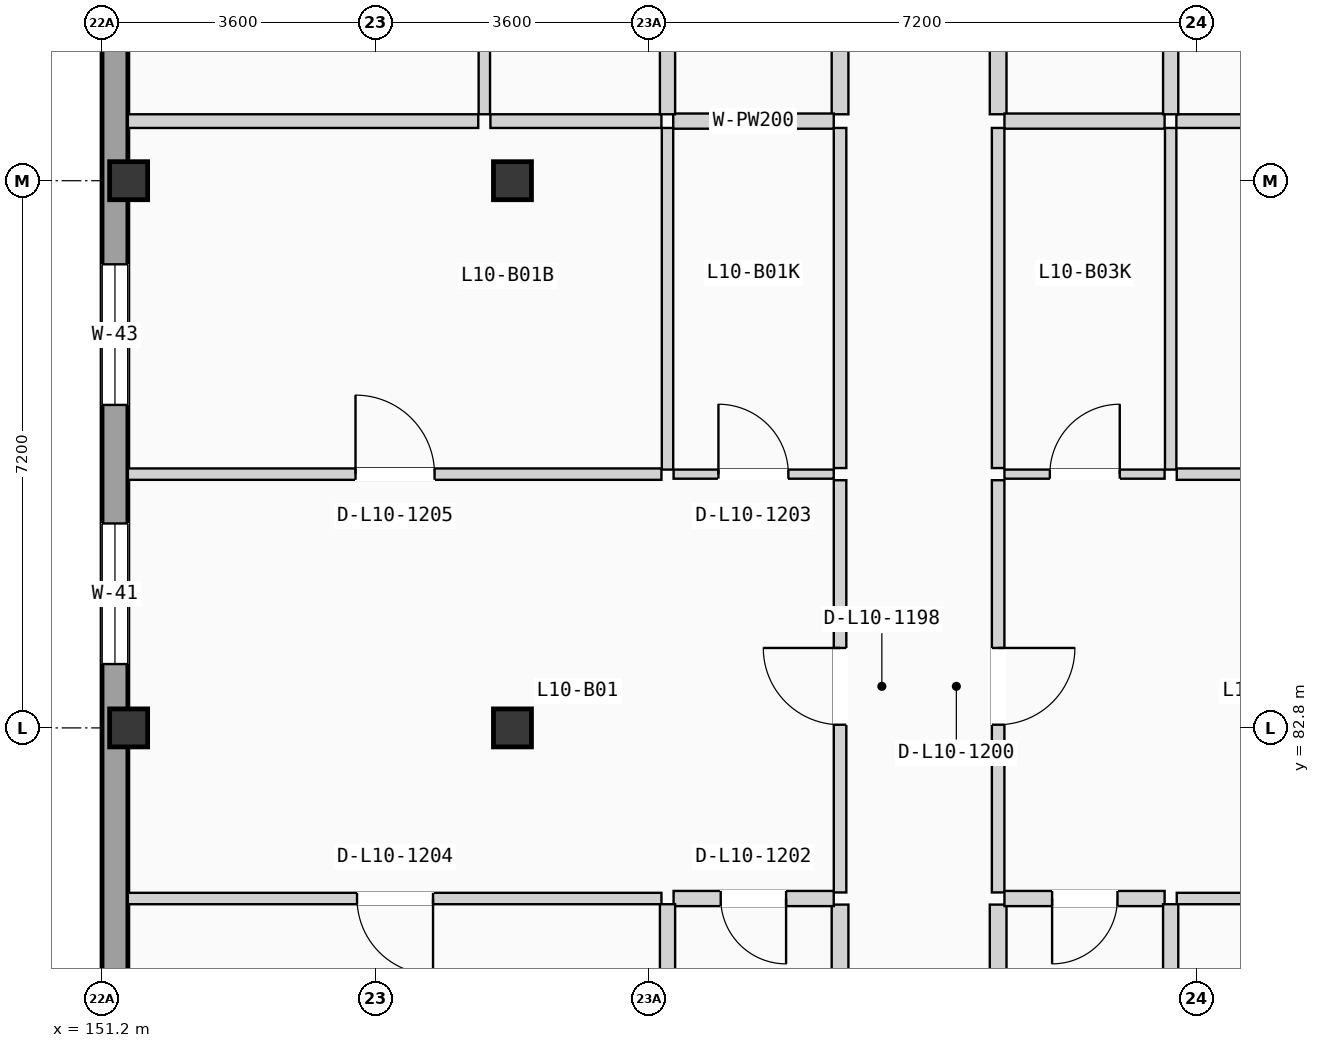
"""IFC4 building model, lengths in metres.
Left out: names, types, materials, properties, quantities, classifications, styles, units other than length and angle.
Written with IfcOpenShell. Run it as: python <this file> out.ifc"""

import sys

from ifc_helpers import new_model, si_unit, direction, frame, frame_2d, origin, origin_2d, place, context, subcontext, project, spatial, rectangle, extrude, element, fill, save


model = new_model("IFC4")
c1 = context("Model", 3, precision=1e-05, world=origin(), true_north=direction((0.0, 1.0)))
c2 = subcontext(c1, "Body", "Model", "MODEL_VIEW")
j1 = project(units=[si_unit("LENGTHUNIT", "METRE"), si_unit("PLANEANGLEUNIT", "RADIAN")], contexts=[c1])
p1 = place(None, origin())
s1 = spatial("IfcSite", under=j1, at=p1, CompositionType="ELEMENT")
p2 = place(p1, origin())
s2 = spatial("IfcBuilding", under=s1, at=p2, CompositionType="ELEMENT")
p3 = place(p2, frame((0.0, 0.0, 34.125)))
s3 = spatial("IfcBuildingStorey", under=s2, at=p3, CompositionType="ELEMENT", Elevation=34.125)
for number, where, z_axis, x_axis in (
    (1, (151.55, 82.8, 0.0), (0.0, 0.0, 1.0), (1.0, 0.0, 0.0)),
    (2, (151.55, 90.0, 0.0), (0.0, 0.0, 1.0), (1.0, 0.0, 0.0)),
    (3, (156.6, 82.8, 0.0), (0.0, 0.0, 1.0), (1.0, 0.0, 0.0)),
    (4, (156.6, 90.0, 0.0), (0.0, 0.0, 1.0), (1.0, 0.0, 0.0)),
):
    element("IfcColumn", number, at=place(p3, frame(where, z_axis=z_axis, x_axis=x_axis)), inside=s3, PredefinedType="COLUMN", context=c2, shape_type="SweptSolid", body=[
        extrude(rectangle(XDim=0.5, YDim=0.5, at=origin_2d()), origin(), (0.0, 0.0, 1.0), 3.15),
    ])
p4 = place(p3, frame((151.37, 68.74, 0.0), z_axis=(0.0, 0.0, 1.0), x_axis=(0.0, 1.0, 0.0)))
e5 = element("IfcWall", 5, at=p4, inside=s3, PredefinedType="SOLIDWALL", context=c2, shape_type="SweptSolid", body=[
    extrude(rectangle(XDim=49.72, YDim=0.34, at=frame_2d((24.86, 0.0))), origin(), (0.0, 0.0, 1.0), 2.89),
])
p5 = place(p4, frame((14.9, 0.0, 0.9)))
e6 = element("IfcOpeningElement", 6, at=p5, cuts=e5, PredefinedType="OPENING", context=c2, shape_type="SweptSolid", body=[
    extrude(rectangle(XDim=1.85, YDim=1.2, at=frame_2d((0.925, 0.6))), frame((0.0, 0.18, 0.0), z_axis=(0.0, -1.0, 0.0), x_axis=(1.0, 0.0, 0.0)), (0.0, 0.0, 1.0), 0.36),
])
p6 = place(p4, frame((8.573, 0.0, 0.855)))
e7 = element("IfcOpeningElement", 7, at=p6, cuts=e5, PredefinedType="OPENING", context=c2, shape_type="SweptSolid", body=[
    extrude(rectangle(XDim=1.85, YDim=1.35, at=frame_2d((0.925, 0.675))), frame((0.0, 0.18, 0.0), z_axis=(0.0, -1.0, 0.0), x_axis=(1.0, 0.0, 0.0)), (0.0, 0.0, 1.0), 0.36),
])
p7 = place(p4, frame((18.31, 0.0, 0.705)))
e8 = element("IfcOpeningElement", 8, at=p7, cuts=e5, PredefinedType="OPENING", context=c2, shape_type="SweptSolid", body=[
    extrude(rectangle(XDim=1.85, YDim=1.5, at=frame_2d((0.925, 0.75))), frame((0.0, 0.18, 0.0), z_axis=(0.0, -1.0, 0.0), x_axis=(1.0, 0.0, 0.0)), (0.0, 0.0, 1.0), 0.36),
])
p8 = place(p4, frame((31.135, 0.0, 0.555)))
e9 = element("IfcOpeningElement", 9, at=p8, cuts=e5, PredefinedType="OPENING", context=c2, shape_type="SweptSolid", body=[
    extrude(rectangle(XDim=1.85, YDim=1.65, at=frame_2d((0.925, 0.825))), frame((0.0, 0.18, 0.0), z_axis=(0.0, -1.0, 0.0), x_axis=(1.0, 0.0, 0.0)), (0.0, 0.0, 1.0), 0.36),
])
p9 = place(p4, frame((24.687, 0.0, 0.85)))
e10 = element("IfcOpeningElement", 10, at=p9, cuts=e5, PredefinedType="OPENING", context=c2, shape_type="SweptSolid", body=[
    extrude(rectangle(XDim=0.95, YDim=1.2, at=frame_2d((0.475, 0.6))), frame((0.0, 0.18, 0.0), z_axis=(0.0, -1.0, 0.0), x_axis=(1.0, 0.0, 0.0)), (0.0, 0.0, 1.0), 0.36),
])
p10 = place(p4, frame((38.195, 0.0, 0.9)))
e11 = element("IfcOpeningElement", 11, at=p10, cuts=e5, PredefinedType="OPENING", context=c2, shape_type="SweptSolid", body=[
    extrude(rectangle(XDim=2.0, YDim=1.2, at=frame_2d((1.0, 0.6))), frame((0.0, 0.18, 0.0), z_axis=(0.0, -1.0, 0.0), x_axis=(1.0, 0.0, 0.0)), (0.0, 0.0, 1.0), 0.36),
])
p11 = place(p3, frame((160.91, 80.635, 0.0), z_axis=(0.0, 0.0, 1.0), x_axis=(0.0, 1.0, 0.0)))
e12 = element("IfcWall", 12, at=p11, inside=s3, PredefinedType="PARTITIONING", context=c2, shape_type="SweptSolid", body=[
    extrude(rectangle(XDim=5.424, YDim=0.165, at=frame_2d((2.712, 0.0))), origin(), (0.0, 0.0, 1.0), 2.87),
])
p12 = place(p11, frame((2.207, 0.0, 0.0)))
e13 = element("IfcOpeningElement", 13, at=p12, cuts=e12, PredefinedType="OPENING", context=c2, shape_type="SweptSolid", body=[
    extrude(rectangle(XDim=1.01, YDim=2.11, at=frame_2d((0.505, 1.055))), frame((0.0, 0.093, 0.0), z_axis=(0.0, -1.0, 0.0), x_axis=(1.0, 0.0, 0.0)), (0.0, 0.0, 1.0), 0.185),
])
p13 = place(p3, frame((160.91, 76.0, 0.0), z_axis=(0.0, 0.0, 1.0), x_axis=(0.0, 1.0, 0.0)))
e14 = element("IfcWall", 14, at=p13, inside=s3, PredefinedType="PLUMBINGWALL", context=c2, shape_type="SweptSolid", body=[
    extrude(rectangle(XDim=4.475, YDim=0.22, at=frame_2d((2.238, 0.0))), origin(), (0.0, 0.0, 1.0), 2.87),
])
p14 = place(p3, frame((160.91, 86.219, 0.0), z_axis=(0.0, 0.0, 1.0), x_axis=(0.0, 1.0, 0.0)))
e15 = element("IfcWall", 15, at=p14, inside=s3, PredefinedType="PARTITIONING", context=c2, shape_type="SweptSolid", body=[
    extrude(rectangle(XDim=4.475, YDim=0.165, at=frame_2d((2.238, 0.0))), origin(), (0.0, 0.0, 1.0), 2.87),
])
p15 = place(p3, frame((160.91, 90.874, 0.0), z_axis=(0.0, 0.0, 1.0), x_axis=(0.0, 1.0, 0.0)))
e16 = element("IfcWall", 16, at=p15, inside=s3, PredefinedType="PLUMBINGWALL", context=c2, shape_type="SweptSolid", body=[
    extrude(rectangle(XDim=7.196, YDim=0.22, at=frame_2d((3.598, 0.0))), origin(), (0.0, 0.0, 1.0), 2.87),
])
p16 = place(p3, frame((162.99, 80.635, 0.0), z_axis=(0.0, 0.0, 1.0), x_axis=(0.0, 1.0, 0.0)))
e17 = element("IfcWall", 17, at=p16, inside=s3, PredefinedType="PARTITIONING", context=c2, shape_type="SweptSolid", body=[
    extrude(rectangle(XDim=5.424, YDim=0.165, at=frame_2d((2.712, 0.0))), origin(), (0.0, 0.0, 1.0), 2.87),
])
p17 = place(p16, frame((2.207, 0.0, 0.0)))
e18 = element("IfcOpeningElement", 18, at=p17, cuts=e17, PredefinedType="OPENING", context=c2, shape_type="SweptSolid", body=[
    extrude(rectangle(XDim=1.01, YDim=2.11, at=frame_2d((0.505, 1.055))), frame((0.0, 0.093, 0.0), z_axis=(0.0, -1.0, 0.0), x_axis=(1.0, 0.0, 0.0)), (0.0, 0.0, 1.0), 0.185),
])
p18 = place(p3, frame((162.99, 75.975, 0.0), z_axis=(0.0, 0.0, 1.0), x_axis=(0.0, 1.0, 0.0)))
e19 = element("IfcWall", 19, at=p18, inside=s3, PredefinedType="PLUMBINGWALL", context=c2, shape_type="SweptSolid", body=[
    extrude(rectangle(XDim=4.5, YDim=0.22, at=frame_2d((2.25, 0.0))), origin(), (0.0, 0.0, 1.0), 2.87),
])
p19 = place(p3, frame((162.99, 86.219, 0.0), z_axis=(0.0, 0.0, 1.0), x_axis=(0.0, 1.0, 0.0)))
e20 = element("IfcWall", 20, at=p19, inside=s3, PredefinedType="PARTITIONING", context=c2, shape_type="SweptSolid", body=[
    extrude(rectangle(XDim=4.475, YDim=0.165, at=frame_2d((2.238, 0.0))), origin(), (0.0, 0.0, 1.0), 2.87),
])
p20 = place(p3, frame((162.99, 90.874, 0.0), z_axis=(0.0, 0.0, 1.0), x_axis=(0.0, 1.0, 0.0)))
e21 = element("IfcWall", 21, at=p20, inside=s3, PredefinedType="PLUMBINGWALL", context=c2, shape_type="SweptSolid", body=[
    extrude(rectangle(XDim=7.196, YDim=0.22, at=frame_2d((3.598, 0.0))), origin(), (0.0, 0.0, 1.0), 2.87),
])
p21 = place(p3, frame((158.72, 80.555, 0.0), z_axis=(0.0, 0.0, 1.0), x_axis=(1.0, 0.0, 0.0)))
e22 = element("IfcWall", 22, at=p21, inside=s3, PredefinedType="PLUMBINGWALL", context=c2, shape_type="SweptSolid", body=[
    extrude(rectangle(XDim=2.107, YDim=0.2, at=frame_2d((1.053, 0.0))), origin(), (0.0, 0.0, 1.0), 2.87),
])
p22 = place(p21, frame((0.62, 0.0, 0.0)))
e23 = element("IfcOpeningElement", 23, at=p22, cuts=e22, PredefinedType="OPENING", context=c2, shape_type="SweptSolid", body=[
    extrude(rectangle(XDim=0.86, YDim=2.0, at=frame_2d((0.43, 1.0))), frame((0.0, 0.11, 0.0), z_axis=(0.0, -1.0, 0.0), x_axis=(1.0, 0.0, 0.0)), (0.0, 0.0, 1.0), 0.22),
])
p23 = place(p3, frame((158.72, 86.139, 0.0), z_axis=(0.0, 0.0, 1.0), x_axis=(1.0, 0.0, 0.0)))
e24 = element("IfcWall", 24, at=p23, inside=s3, PredefinedType="PARTITIONING", context=c2, shape_type="SweptSolid", body=[
    extrude(rectangle(XDim=2.107, YDim=0.12, at=frame_2d((1.053, 0.0))), origin(), (0.0, 0.0, 1.0), 2.87),
])
p24 = place(p23, frame((0.59, 0.0, 0.0)))
e25 = element("IfcOpeningElement", 25, at=p24, cuts=e24, PredefinedType="OPENING", context=c2, shape_type="SweptSolid", body=[
    extrude(rectangle(XDim=0.92, YDim=2.02, at=frame_2d((0.46, 1.01))), frame((0.0, 0.07, 0.0), z_axis=(0.0, -1.0, 0.0), x_axis=(1.0, 0.0, 0.0)), (0.0, 0.0, 1.0), 0.14),
])
p25 = place(p3, frame((151.54, 80.555, 0.0), z_axis=(0.0, 0.0, 1.0), x_axis=(1.0, 0.0, 0.0)))
e26 = element("IfcWall", 26, at=p25, inside=s3, PredefinedType="PARTITIONING", context=c2, shape_type="SweptSolid", body=[
    extrude(rectangle(XDim=7.02, YDim=0.15, at=frame_2d((3.51, 0.0))), origin(), (0.0, 0.0, 1.0), 2.87),
])
p26 = place(p25, frame((3.015, 0.0, 0.0)))
e27 = element("IfcOpeningElement", 27, at=p26, cuts=e26, PredefinedType="OPENING", context=c2, shape_type="SweptSolid", body=[
    extrude(rectangle(XDim=1.0, YDim=2.06, at=frame_2d((0.5, 1.03))), frame((0.0, 0.085, 0.0), z_axis=(0.0, -1.0, 0.0), x_axis=(1.0, 0.0, 0.0)), (0.0, 0.0, 1.0), 0.17),
])
p27 = place(p3, frame((151.54, 86.139, 0.0), z_axis=(0.0, 0.0, 1.0), x_axis=(1.0, 0.0, 0.0)))
e28 = element("IfcWall", 28, at=p27, inside=s3, PredefinedType="PARTITIONING", context=c2, shape_type="SweptSolid", body=[
    extrude(rectangle(XDim=7.02, YDim=0.15, at=frame_2d((3.51, 0.0))), origin(), (0.0, 0.0, 1.0), 2.87),
])
p28 = place(p27, frame((2.995, 0.0, 0.0)))
e29 = element("IfcOpeningElement", 29, at=p28, cuts=e28, PredefinedType="OPENING", context=c2, shape_type="SweptSolid", body=[
    extrude(rectangle(XDim=1.04, YDim=2.08, at=frame_2d((0.52, 1.04))), frame((0.0, 0.085, 0.0), z_axis=(0.0, -1.0, 0.0), x_axis=(1.0, 0.0, 0.0)), (0.0, 0.0, 1.0), 0.17),
])
p29 = place(p3, frame((158.64, 76.0, 0.0), z_axis=(0.0, 0.0, 1.0), x_axis=(0.0, 1.0, 0.0)))
e30 = element("IfcWall", 30, at=p29, inside=s3, PredefinedType="PLUMBINGWALL", context=c2, shape_type="SweptSolid", body=[
    extrude(rectangle(XDim=4.48, YDim=0.2, at=frame_2d((2.24, 0.0))), origin(), (0.0, 0.0, 1.0), 2.87),
])
p30 = place(p3, frame((158.64, 86.199, 0.0), z_axis=(0.0, 0.0, 1.0), x_axis=(0.0, 1.0, 0.0)))
e31 = element("IfcWall", 31, at=p30, inside=s3, PredefinedType="PARTITIONING", context=c2, shape_type="SweptSolid", body=[
    extrude(rectangle(XDim=4.495, YDim=0.15, at=frame_2d((2.248, 0.0))), origin(), (0.0, 0.0, 1.0), 2.87),
])
p31 = place(p3, frame((158.715, 90.784, 0.0), z_axis=(0.0, 0.0, 1.0), x_axis=(1.0, 0.0, 0.0)))
e32 = element("IfcWall", 32, at=p31, inside=s3, PredefinedType="PLUMBINGWALL", context=c2, shape_type="SweptSolid", body=[
    extrude(rectangle(XDim=2.112, YDim=0.2, at=frame_2d((1.056, 0.0))), origin(), (0.0, 0.0, 1.0), 2.87),
])
p32 = place(p3, frame((151.54, 90.784, 0.0), z_axis=(0.0, 0.0, 1.0), x_axis=(1.0, 0.0, 0.0)))
e33 = element("IfcWall", 33, at=p32, inside=s3, PredefinedType="PARTITIONING", context=c2, shape_type="SweptSolid", body=[
    extrude(rectangle(XDim=4.61, YDim=0.18, at=frame_2d((2.305, 0.0))), origin(), (0.0, 0.0, 1.0), 2.87),
])
p33 = place(p3, frame((156.31, 90.784, 0.0), z_axis=(0.0, 0.0, 1.0), x_axis=(1.0, 0.0, 0.0)))
e34 = element("IfcWall", 34, at=p33, inside=s3, PredefinedType="PARTITIONING", context=c2, shape_type="SweptSolid", body=[
    extrude(rectangle(XDim=2.25, YDim=0.18, at=frame_2d((1.125, 0.0))), origin(), (0.0, 0.0, 1.0), 2.87),
])
p34 = place(p3, frame((158.64, 90.874, 0.0), z_axis=(0.0, 0.0, 1.0), x_axis=(0.0, 1.0, 0.0)))
e35 = element("IfcWall", 35, at=p34, inside=s3, PredefinedType="PLUMBINGWALL", context=c2, shape_type="SweptSolid", body=[
    extrude(rectangle(XDim=7.216, YDim=0.2, at=frame_2d((3.608, 0.0))), origin(), (0.0, 0.0, 1.0), 2.87),
])
p35 = place(p34, frame((3.173, 0.0, 0.0)))
e36 = element("IfcOpeningElement", 36, at=p35, cuts=e35, PredefinedType="OPENING", context=c2, shape_type="SweptSolid", body=[
    extrude(rectangle(XDim=0.85, YDim=2.01, at=frame_2d((0.425, 1.005))), frame((0.0, 0.11, 0.0), z_axis=(0.0, -1.0, 0.0), x_axis=(1.0, 0.0, 0.0)), (0.0, 0.0, 1.0), 0.22),
])
p36 = place(p3, frame((156.23, 90.874, 0.0), z_axis=(0.0, 0.0, 1.0), x_axis=(0.0, 1.0, 0.0)))
e37 = element("IfcWall", 37, at=p36, inside=s3, PredefinedType="PARTITIONING", context=c2, shape_type="SweptSolid", body=[
    extrude(rectangle(XDim=7.201, YDim=0.15, at=frame_2d((3.601, 0.0))), origin(), (0.0, 0.0, 1.0), 2.87),
])
p37 = place(p3, frame((163.073, 80.555, 0.0), z_axis=(0.0, 0.0, 1.0), x_axis=(1.0, 0.0, 0.0)))
e38 = element("IfcWall", 38, at=p37, inside=s3, PredefinedType="PLUMBINGWALL", context=c2, shape_type="SweptSolid", body=[
    extrude(rectangle(XDim=2.107, YDim=0.2, at=frame_2d((1.053, 0.0))), origin(), (0.0, 0.0, 1.0), 2.87),
])
p38 = place(p37, frame((0.627, 0.0, 0.0)))
e39 = element("IfcOpeningElement", 39, at=p38, cuts=e38, PredefinedType="OPENING", context=c2, shape_type="SweptSolid", body=[
    extrude(rectangle(XDim=0.86, YDim=2.0, at=frame_2d((0.43, 1.0))), frame((0.0, 0.11, 0.0), z_axis=(0.0, -1.0, 0.0), x_axis=(1.0, 0.0, 0.0)), (0.0, 0.0, 1.0), 0.22),
])
p39 = place(p3, frame((163.073, 86.139, 0.0), z_axis=(0.0, 0.0, 1.0), x_axis=(1.0, 0.0, 0.0)))
e40 = element("IfcWall", 40, at=p39, inside=s3, PredefinedType="PARTITIONING", context=c2, shape_type="SweptSolid", body=[
    extrude(rectangle(XDim=2.107, YDim=0.12, at=frame_2d((1.053, 0.0))), origin(), (0.0, 0.0, 1.0), 2.87),
])
p40 = place(p39, frame((0.597, 0.0, 0.0)))
e41 = element("IfcOpeningElement", 41, at=p40, cuts=e40, PredefinedType="OPENING", context=c2, shape_type="SweptSolid", body=[
    extrude(rectangle(XDim=0.92, YDim=2.02, at=frame_2d((0.46, 1.01))), frame((0.0, 0.07, 0.0), z_axis=(0.0, -1.0, 0.0), x_axis=(1.0, 0.0, 0.0)), (0.0, 0.0, 1.0), 0.14),
])
p41 = place(p3, frame((165.34, 80.555, 0.0), z_axis=(0.0, 0.0, 1.0), x_axis=(1.0, 0.0, 0.0)))
e42 = element("IfcWall", 42, at=p41, inside=s3, PredefinedType="PARTITIONING", context=c2, shape_type="SweptSolid", body=[
    extrude(rectangle(XDim=7.12, YDim=0.15, at=frame_2d((3.56, 0.0))), origin(), (0.0, 0.0, 1.0), 2.87),
])
p42 = place(p41, frame((3.085, 0.0, 0.0)))
e43 = element("IfcOpeningElement", 43, at=p42, cuts=e42, PredefinedType="OPENING", context=c2, shape_type="SweptSolid", body=[
    extrude(rectangle(XDim=0.94, YDim=2.06, at=frame_2d((0.47, 1.03))), frame((0.0, 0.085, 0.0), z_axis=(0.0, -1.0, 0.0), x_axis=(1.0, 0.0, 0.0)), (0.0, 0.0, 1.0), 0.17),
])
p43 = place(p3, frame((165.34, 86.139, 0.0), z_axis=(0.0, 0.0, 1.0), x_axis=(1.0, 0.0, 0.0)))
e44 = element("IfcWall", 44, at=p43, inside=s3, PredefinedType="PARTITIONING", context=c2, shape_type="SweptSolid", body=[
    extrude(rectangle(XDim=7.12, YDim=0.15, at=frame_2d((3.56, 0.0))), origin(), (0.0, 0.0, 1.0), 2.87),
])
p44 = place(p43, frame((3.055, 0.0, 0.0)))
e45 = element("IfcOpeningElement", 45, at=p44, cuts=e44, PredefinedType="OPENING", context=c2, shape_type="SweptSolid", body=[
    extrude(rectangle(XDim=1.0, YDim=2.06, at=frame_2d((0.5, 1.03))), frame((0.0, 0.085, 0.0), z_axis=(0.0, -1.0, 0.0), x_axis=(1.0, 0.0, 0.0)), (0.0, 0.0, 1.0), 0.17),
])
p45 = place(p3, frame((165.26, 75.975, 0.0), z_axis=(0.0, 0.0, 1.0), x_axis=(0.0, 1.0, 0.0)))
e46 = element("IfcWall", 46, at=p45, inside=s3, PredefinedType="PLUMBINGWALL", context=c2, shape_type="SweptSolid", body=[
    extrude(rectangle(XDim=4.505, YDim=0.2, at=frame_2d((2.252, 0.0))), origin(), (0.0, 0.0, 1.0), 2.87),
])
p46 = place(p3, frame((165.26, 86.199, 0.0), z_axis=(0.0, 0.0, 1.0), x_axis=(0.0, 1.0, 0.0)))
e47 = element("IfcWall", 47, at=p46, inside=s3, PredefinedType="PARTITIONING", context=c2, shape_type="SweptSolid", body=[
    extrude(rectangle(XDim=4.495, YDim=0.15, at=frame_2d((2.248, 0.0))), origin(), (0.0, 0.0, 1.0), 2.87),
])
p47 = place(p3, frame((163.073, 90.784, 0.0), z_axis=(0.0, 0.0, 1.0), x_axis=(1.0, 0.0, 0.0)))
e48 = element("IfcWall", 48, at=p47, inside=s3, PredefinedType="PLUMBINGWALL", context=c2, shape_type="SweptSolid", body=[
    extrude(rectangle(XDim=2.107, YDim=0.2, at=frame_2d((1.053, 0.0))), origin(), (0.0, 0.0, 1.0), 2.87),
])
p48 = place(p3, frame((165.335, 90.784, 0.0), z_axis=(0.0, 0.0, 1.0), x_axis=(1.0, 0.0, 0.0)))
e49 = element("IfcWall", 49, at=p48, inside=s3, PredefinedType="PARTITIONING", context=c2, shape_type="SweptSolid", body=[
    extrude(rectangle(XDim=2.255, YDim=0.18, at=frame_2d((1.127, 0.0))), origin(), (0.0, 0.0, 1.0), 2.87),
])
p49 = place(p3, frame((165.26, 90.874, 0.0), z_axis=(0.0, 0.0, 1.0), x_axis=(0.0, 1.0, 0.0)))
e50 = element("IfcWall", 50, at=p49, inside=s3, PredefinedType="PLUMBINGWALL", context=c2, shape_type="SweptSolid", body=[
    extrude(rectangle(XDim=7.216, YDim=0.2, at=frame_2d((3.608, 0.0))), origin(), (0.0, 0.0, 1.0), 2.87),
])
p50 = place(p49, frame((3.173, 0.0, 0.0)))
e51 = element("IfcOpeningElement", 51, at=p50, cuts=e50, PredefinedType="OPENING", context=c2, shape_type="SweptSolid", body=[
    extrude(rectangle(XDim=0.85, YDim=2.01, at=frame_2d((0.425, 1.005))), frame((0.0, 0.11, 0.0), z_axis=(0.0, -1.0, 0.0), x_axis=(1.0, 0.0, 0.0)), (0.0, 0.0, 1.0), 0.22),
])
p51 = place(p5, origin())
e52 = element("IfcWindow", 52, at=p51, inside=s3, PartitioningType="DOUBLE_PANEL_VERTICAL", PredefinedType="WINDOW", context=c2, shape_type="SweptSolid", body=[
    extrude(rectangle(XDim=1.85, YDim=1.2, at=frame_2d((0.925, 0.6))), frame((0.0, 0.03, 0.0), z_axis=(0.0, -1.0, 0.0), x_axis=(1.0, 0.0, 0.0)), (0.0, 0.0, 1.0), 0.06),
])
fill(e6, e52)
p52 = place(p7, origin())
e53 = element("IfcWindow", 53, at=p52, inside=s3, PartitioningType="DOUBLE_PANEL_VERTICAL", PredefinedType="WINDOW", context=c2, shape_type="SweptSolid", body=[
    extrude(rectangle(XDim=1.85, YDim=1.5, at=frame_2d((0.925, 0.75))), frame((0.0, 0.03, 0.0), z_axis=(0.0, -1.0, 0.0), x_axis=(1.0, 0.0, 0.0)), (0.0, 0.0, 1.0), 0.06),
])
fill(e8, e53)
p53 = place(p12, origin())
e54 = element("IfcDoor", 54, at=p53, inside=s3, OperationType="SINGLE_SWING_RIGHT", PredefinedType="DOOR", context=c2, shape_type="SweptSolid", body=[
    extrude(rectangle(XDim=1.01, YDim=2.11, at=frame_2d((0.505, 1.055))), frame((0.0, 0.025, 0.0), z_axis=(0.0, -1.0, 0.0), x_axis=(1.0, 0.0, 0.0)), (0.0, 0.0, 1.0), 0.05),
])
fill(e13, e54)
p54 = place(p17, frame((1.01, 0.0, 0.0), z_axis=(0.0, 0.0, 1.0), x_axis=(-1.0, 0.0, 0.0)))
e55 = element("IfcDoor", 55, at=p54, inside=s3, OperationType="SINGLE_SWING_RIGHT", PredefinedType="DOOR", context=c2, shape_type="SweptSolid", body=[
    extrude(rectangle(XDim=1.01, YDim=2.11, at=frame_2d((0.505, 1.055))), frame((0.0, 0.025, 0.0), z_axis=(0.0, -1.0, 0.0), x_axis=(1.0, 0.0, 0.0)), (0.0, 0.0, 1.0), 0.05),
])
fill(e18, e55)
p55 = place(p22, frame((0.86, 0.0, 0.0), z_axis=(0.0, 0.0, 1.0), x_axis=(-1.0, 0.0, 0.0)))
e56 = element("IfcDoor", 56, at=p55, inside=s3, OperationType="SINGLE_SWING_RIGHT", PredefinedType="DOOR", context=c2, shape_type="SweptSolid", body=[
    extrude(rectangle(XDim=0.86, YDim=2.0, at=frame_2d((0.43, 1.0))), frame((0.0, 0.025, 0.0), z_axis=(0.0, -1.0, 0.0), x_axis=(1.0, 0.0, 0.0)), (0.0, 0.0, 1.0), 0.05),
])
fill(e23, e56)
p56 = place(p24, origin())
e57 = element("IfcDoor", 57, at=p56, inside=s3, OperationType="SINGLE_SWING_LEFT", PredefinedType="DOOR", context=c2, shape_type="SweptSolid", body=[
    extrude(rectangle(XDim=0.92, YDim=2.02, at=frame_2d((0.46, 1.01))), frame((0.0, 0.025, 0.0), z_axis=(0.0, -1.0, 0.0), x_axis=(1.0, 0.0, 0.0)), (0.0, 0.0, 1.0), 0.05),
])
fill(e25, e57)
p57 = place(p26, frame((1.0, 0.0, 0.0), z_axis=(0.0, 0.0, 1.0), x_axis=(-1.0, 0.0, 0.0)))
e58 = element("IfcDoor", 58, at=p57, inside=s3, OperationType="SINGLE_SWING_RIGHT", PredefinedType="DOOR", context=c2, shape_type="SweptSolid", body=[
    extrude(rectangle(XDim=1.0, YDim=2.06, at=frame_2d((0.5, 1.03))), frame((0.0, 0.025, 0.0), z_axis=(0.0, -1.0, 0.0), x_axis=(1.0, 0.0, 0.0)), (0.0, 0.0, 1.0), 0.05),
])
fill(e27, e58)
p58 = place(p28, origin())
e59 = element("IfcDoor", 59, at=p58, inside=s3, OperationType="SINGLE_SWING_LEFT", PredefinedType="DOOR", context=c2, shape_type="SweptSolid", body=[
    extrude(rectangle(XDim=1.04, YDim=2.08, at=frame_2d((0.52, 1.04))), frame((0.0, 0.025, 0.0), z_axis=(0.0, -1.0, 0.0), x_axis=(1.0, 0.0, 0.0)), (0.0, 0.0, 1.0), 0.05),
])
fill(e29, e59)
p59 = place(p38, frame((0.86, 0.0, 0.0), z_axis=(0.0, 0.0, 1.0), x_axis=(-1.0, 0.0, 0.0)))
e60 = element("IfcDoor", 60, at=p59, inside=s3, OperationType="SINGLE_SWING_LEFT", PredefinedType="DOOR", context=c2, shape_type="SweptSolid", body=[
    extrude(rectangle(XDim=0.86, YDim=2.0, at=frame_2d((0.43, 1.0))), frame((0.0, 0.025, 0.0), z_axis=(0.0, -1.0, 0.0), x_axis=(1.0, 0.0, 0.0)), (0.0, 0.0, 1.0), 0.05),
])
fill(e39, e60)
p60 = place(p40, origin())
e61 = element("IfcDoor", 61, at=p60, inside=s3, OperationType="SINGLE_SWING_RIGHT", PredefinedType="DOOR", context=c2, shape_type="SweptSolid", body=[
    extrude(rectangle(XDim=0.92, YDim=2.02, at=frame_2d((0.46, 1.01))), frame((0.0, 0.025, 0.0), z_axis=(0.0, -1.0, 0.0), x_axis=(1.0, 0.0, 0.0)), (0.0, 0.0, 1.0), 0.05),
])
fill(e41, e61)
save(model, sys.argv[1])
